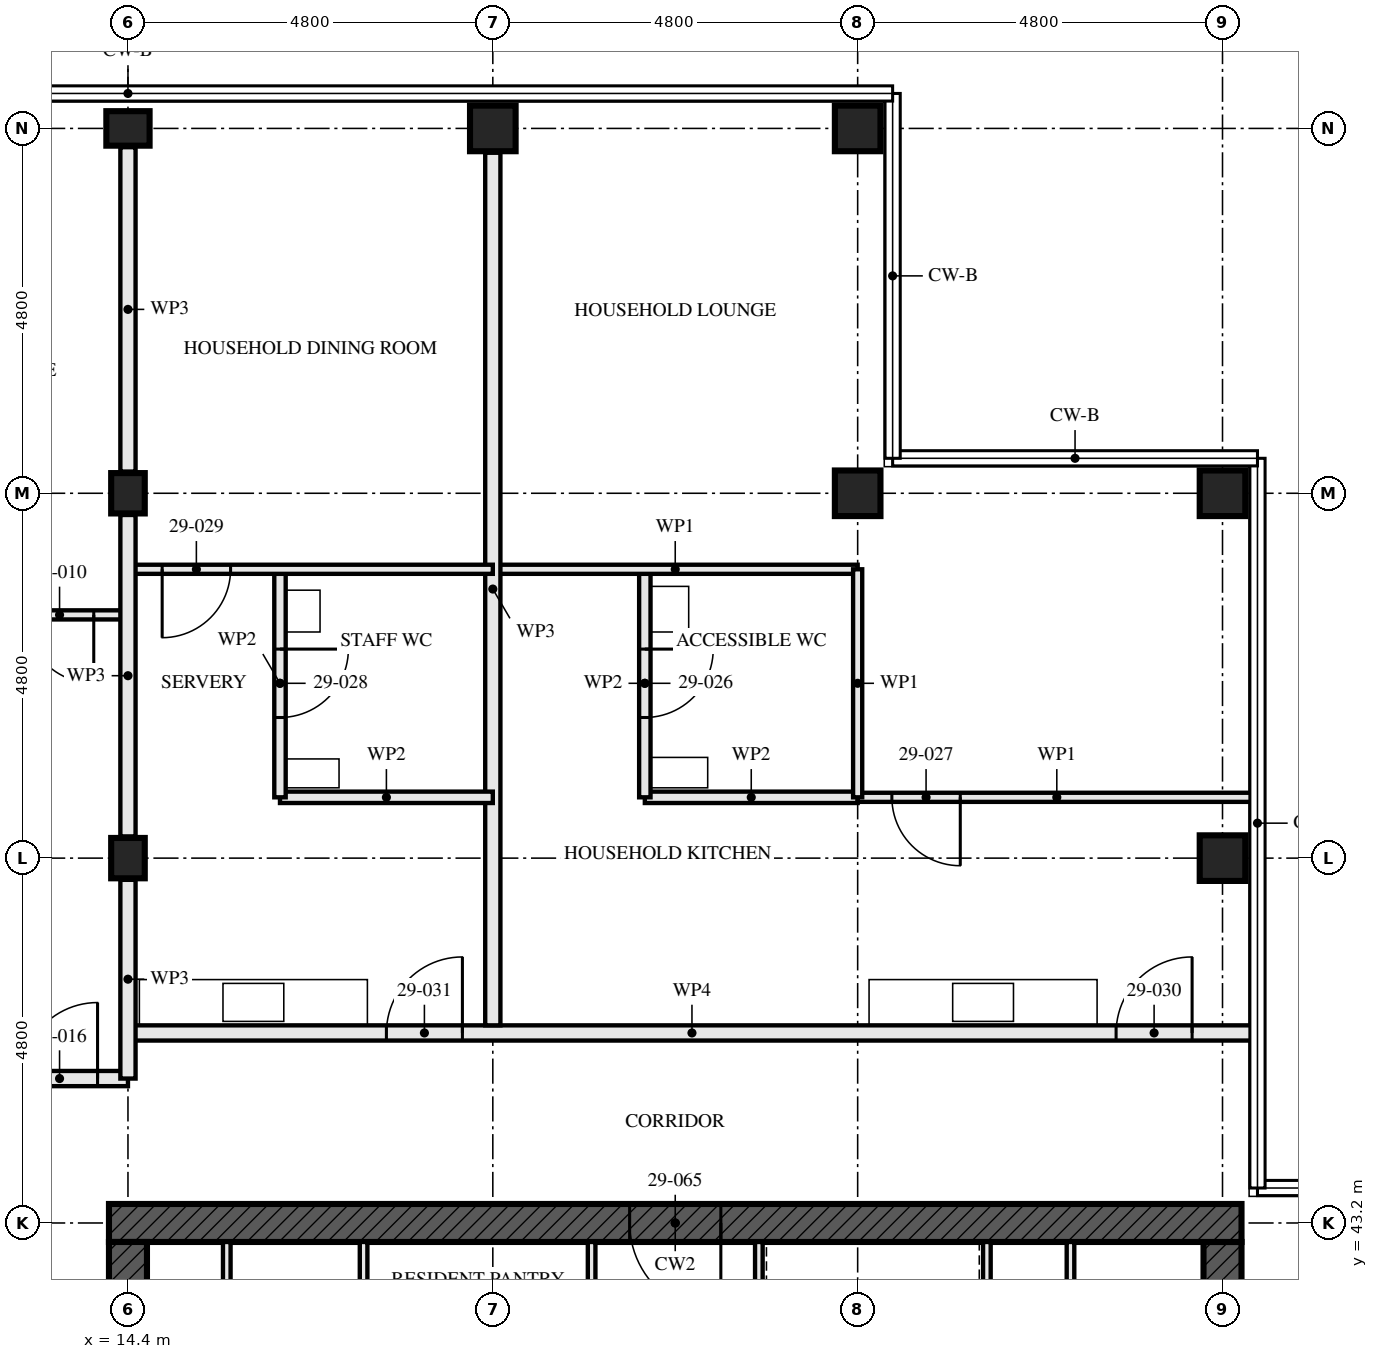
"""IFC4 building model, lengths in metres.
Left out: names, types, materials, properties, quantities, classifications, styles, units other than length and angle.
Written with IfcOpenShell. Run it as: python <this file> out.ifc"""

import sys

from ifc_helpers import new_model, si_unit, direction, frame, frame_2d, origin, origin_2d, place, context, subcontext, project, spatial, rectangle, hollow_rectangle, i_section, extrude, element, fill, save


model = new_model("IFC4")
c1 = context("Model", 3, precision=1e-05, world=origin(), true_north=direction((0.0, 1.0)))
c2 = subcontext(c1, "Body", "Model", "MODEL_VIEW")
j1 = project(units=[si_unit("LENGTHUNIT", "METRE"), si_unit("PLANEANGLEUNIT", "RADIAN")], contexts=[c1])
p1 = place(None, origin())
s1 = spatial("IfcSite", under=j1, at=p1, CompositionType="ELEMENT")
p2 = place(p1, origin())
s2 = spatial("IfcBuilding", under=s1, at=p2, CompositionType="ELEMENT")
p3 = place(p2, frame((0.0, 0.0, 108.5)))
s3 = spatial("IfcBuildingStorey", under=s2, at=p3, CompositionType="ELEMENT", Elevation=108.5)
for number, where, z_axis, x_axis in (
    (1, (14.4, 48.0, 0.0), (0.0, 0.0, 1.0), (1.0, 0.0, 0.0)),
    (2, (14.4, 52.8, 0.0), (0.0, 0.0, 1.0), (1.0, 0.0, 0.0)),
):
    element("IfcColumn", number, at=place(p3, frame(where, z_axis=z_axis, x_axis=x_axis)), inside=s3, PredefinedType="COLUMN", context=c2, shape_type="SweptSolid", body=[
        extrude(i_section(OverallWidth=0.442, OverallDepth=0.531, WebThickness=0.066, FlangeThickness=0.106, FilletRadius=0.015, at=origin_2d()), origin(), (0.0, 0.0, 1.0), 3.5),
    ])
p4 = place(p3, frame((14.4, 57.6, 0.0), z_axis=(0.0, 0.0, 1.0), x_axis=(0.0, 1.0, 0.0)))
e3 = element("IfcColumn", 3, at=p4, inside=s3, PredefinedType="COLUMN", context=c2, shape_type="SweptSolid", body=[
    extrude(i_section(OverallWidth=0.454, OverallDepth=0.569, WebThickness=0.078, FlangeThickness=0.125, FilletRadius=0.015, at=origin_2d()), origin(), (0.0, 0.0, 1.0), 3.5),
])
for number, where, z_axis, x_axis in (
    (4, (19.2, 57.6, 0.0), (0.0, 0.0, 1.0), (0.0, 1.0, 0.0)),
    (5, (24.0, 52.8, 0.0), (0.0, 0.0, 1.0), (0.0, 1.0, 0.0)),
    (6, (24.0, 57.6, 0.0), (0.0, 0.0, 1.0), (0.0, 1.0, 0.0)),
):
    element("IfcColumn", number, at=place(p3, frame(where, z_axis=z_axis, x_axis=x_axis)), inside=s3, PredefinedType="COLUMN", context=c2, shape_type="SweptSolid", body=[
        extrude(hollow_rectangle(XDim=0.6, YDim=0.6, WallThickness=0.06, at=origin_2d()), origin(), (0.0, 0.0, 1.0), 3.5),
    ])
p5 = place(p3, frame((28.8, 48.0, 0.0), z_axis=(0.0, 0.0, 1.0), x_axis=(1.0, 0.0, 0.0)))
e7 = element("IfcColumn", 7, at=p5, inside=s3, PredefinedType="COLUMN", context=c2, shape_type="SweptSolid", body=[
    extrude(hollow_rectangle(XDim=0.6, YDim=0.6, WallThickness=0.08, at=origin_2d()), origin(), (0.0, 0.0, 1.0), 3.5),
])
p6 = place(p3, frame((28.8, 52.8, 0.0), z_axis=(0.0, 0.0, 1.0), x_axis=(0.0, 1.0, 0.0)))
e8 = element("IfcColumn", 8, at=p6, inside=s3, PredefinedType="COLUMN", context=c2, shape_type="SweptSolid", body=[
    extrude(hollow_rectangle(XDim=0.6, YDim=0.6, WallThickness=0.06, at=origin_2d()), origin(), (0.0, 0.0, 1.0), 3.5),
])
p7 = place(p3, frame((29.05, 43.2, -0.17), z_axis=(0.0, 0.0, 1.0), x_axis=(-1.0, 0.0, 0.0)))
e9 = element("IfcWall", 9, at=p7, inside=s3, PredefinedType="SHEAR", context=c2, shape_type="SweptSolid", body=[
    extrude(rectangle(XDim=14.9, YDim=0.5, at=frame_2d((7.45, 0.0))), origin(), (0.0, 0.0, 1.0), 3.5),
])
p8 = place(p7, frame((6.85, 0.0, 0.17)))
e10 = element("IfcOpeningElement", 10, at=p8, cuts=e9, PredefinedType="OPENING", context=c2, shape_type="SweptSolid", body=[
    extrude(rectangle(XDim=1.2, YDim=2.1, at=frame_2d((0.6, 1.05))), frame((0.0, 0.26, 0.0), z_axis=(0.0, -1.0, 0.0), x_axis=(1.0, 0.0, 0.0)), (0.0, 0.0, 1.0), 0.521),
])
p9 = place(p3, frame((14.4, 42.95, -0.17), z_axis=(0.0, 0.0, 1.0), x_axis=(0.0, -1.0, 0.0)))
e11 = element("IfcWall", 11, at=p9, inside=s3, PredefinedType="SHEAR", context=c2, shape_type="SweptSolid", body=[
    extrude(rectangle(XDim=13.9, YDim=0.5, at=frame_2d((6.95, 0.0))), origin(), (0.0, 0.0, 1.0), 3.5),
])
p10 = place(p9, frame((6.35, 0.0, 0.17)))
e12 = element("IfcOpeningElement", 12, at=p10, cuts=e11, PredefinedType="OPENING", context=c2, shape_type="SweptSolid", body=[
    extrude(rectangle(XDim=1.2, YDim=2.1, at=frame_2d((0.6, 1.05))), frame((0.0, 0.26, 0.0), z_axis=(0.0, -1.0, 0.0), x_axis=(1.0, 0.0, 0.0)), (0.0, 0.0, 1.0), 0.521),
])
p11 = place(p3, frame((28.8, 29.05, -0.17), z_axis=(0.0, 0.0, 1.0), x_axis=(0.0, 1.0, 0.0)))
e13 = element("IfcWall", 13, at=p11, inside=s3, PredefinedType="SHEAR", context=c2, shape_type="SweptSolid", body=[
    extrude(rectangle(XDim=13.9, YDim=0.5, at=frame_2d((6.95, 0.0))), origin(), (0.0, 0.0, 1.0), 3.5),
])
p12 = place(p11, frame((6.35, 0.0, 0.17)))
e14 = element("IfcOpeningElement", 14, at=p12, cuts=e13, PredefinedType="OPENING", context=c2, shape_type="SweptSolid", body=[
    extrude(rectangle(XDim=1.2, YDim=2.1, at=frame_2d((0.6, 1.05))), frame((0.0, 0.26, 0.0), z_axis=(0.0, -1.0, 0.0), x_axis=(1.0, 0.0, 0.0)), (0.0, 0.0, 1.0), 0.521),
])
p13 = place(p3, frame((14.4, 51.2, 0.0), z_axis=(0.0, 0.0, 1.0), x_axis=(-1.0, 0.0, 0.0)))
e15 = element("IfcWall", 15, at=p13, inside=s3, PredefinedType="PARTITIONING", context=c2, shape_type="SweptSolid", body=[
    extrude(rectangle(XDim=4.8, YDim=0.12, at=frame_2d((2.4, 0.0))), origin(), (0.0, 0.0, 1.0), 3.33),
])
p14 = place(p13, frame((0.45, 0.0, 0.0)))
e16 = element("IfcOpeningElement", 16, at=p14, cuts=e15, PredefinedType="OPENING", context=c2, shape_type="SweptSolid", body=[
    extrude(rectangle(XDim=0.9, YDim=2.1, at=frame_2d((0.45, 1.05))), frame((0.0, 0.071, 0.0), z_axis=(0.0, -1.0, 0.0), x_axis=(1.0, 0.0, 0.0)), (0.0, 0.0, 1.0), 0.141),
])
p15 = place(p13, frame((2.925, 0.0, 0.0)))
e17 = element("IfcOpeningElement", 17, at=p15, cuts=e15, PredefinedType="OPENING", context=c2, shape_type="SweptSolid", body=[
    extrude(rectangle(XDim=0.95, YDim=2.1, at=frame_2d((0.475, 1.05))), frame((0.0, 0.071, 0.0), z_axis=(0.0, -1.0, 0.0), x_axis=(1.0, 0.0, 0.0)), (0.0, 0.0, 1.0), 0.141),
])
p16 = place(p3, frame((14.4, 45.1, 0.0), z_axis=(0.0, 0.0, 1.0), x_axis=(-1.0, 0.0, 0.0)))
e18 = element("IfcWall", 18, at=p16, inside=s3, PredefinedType="PARTITIONING", context=c2, shape_type="SweptSolid", body=[
    extrude(rectangle(XDim=9.6, YDim=0.2, at=frame_2d((4.8, 0.0))), origin(), (0.0, 0.0, 1.0), 3.33),
])
p17 = place(p16, frame((0.4, 0.0, 0.0)))
e19 = element("IfcOpeningElement", 19, at=p17, cuts=e18, PredefinedType="OPENING", context=c2, shape_type="SweptSolid", body=[
    extrude(rectangle(XDim=1.0, YDim=2.1, at=frame_2d((0.5, 1.05))), frame((0.0, 0.111, 0.0), z_axis=(0.0, -1.0, 0.0), x_axis=(1.0, 0.0, 0.0)), (0.0, 0.0, 1.0), 0.221),
])
p18 = place(p16, frame((5.2, 0.0, 0.0)))
e20 = element("IfcOpeningElement", 20, at=p18, cuts=e18, PredefinedType="OPENING", context=c2, shape_type="SweptSolid", body=[
    extrude(rectangle(XDim=1.0, YDim=2.1, at=frame_2d((0.5, 1.05))), frame((0.0, 0.111, 0.0), z_axis=(0.0, -1.0, 0.0), x_axis=(1.0, 0.0, 0.0)), (0.0, 0.0, 1.0), 0.221),
])
p19 = place(p3, frame((21.2, 51.8, 0.0), z_axis=(0.0, 0.0, 1.0), x_axis=(0.0, -1.0, 0.0)))
e21 = element("IfcWall", 21, at=p19, inside=s3, PredefinedType="PARTITIONING", context=c2, shape_type="SweptSolid", body=[
    extrude(rectangle(XDim=3.0, YDim=0.15, at=frame_2d((1.5, 0.0))), origin(), (0.0, 0.0, 1.0), 3.33),
])
p20 = place(p19, frame((1.05, 0.0, 0.0)))
e22 = element("IfcOpeningElement", 22, at=p20, cuts=e21, PredefinedType="OPENING", context=c2, shape_type="SweptSolid", body=[
    extrude(rectangle(XDim=0.9, YDim=2.1, at=frame_2d((0.45, 1.05))), frame((0.0, 0.085, 0.0), z_axis=(0.0, -1.0, 0.0), x_axis=(1.0, 0.0, 0.0)), (0.0, 0.0, 1.0), 0.171),
])
p21 = place(p3, frame((24.0, 48.8, 0.0), z_axis=(0.0, 0.0, 1.0), x_axis=(-1.0, 0.0, 0.0)))
e23 = element("IfcWall", 23, at=p21, inside=s3, PredefinedType="PARTITIONING", context=c2, shape_type="SweptSolid", body=[
    extrude(rectangle(XDim=2.8, YDim=0.15, at=frame_2d((1.4, 0.0))), origin(), (0.0, 0.0, 1.0), 3.33),
])
p22 = place(p3, frame((29.24, 48.8, 0.0), z_axis=(0.0, 0.0, 1.0), x_axis=(-1.0, 0.0, 0.0)))
e24 = element("IfcWall", 24, at=p22, inside=s3, PredefinedType="PARTITIONING", context=c2, shape_type="SweptSolid", body=[
    extrude(rectangle(XDim=5.24, YDim=0.12, at=frame_2d((2.62, 0.0))), origin(), (0.0, 0.0, 1.0), 2.32),
])
p23 = place(p22, frame((3.89, 0.0, 0.0)))
e25 = element("IfcOpeningElement", 25, at=p23, cuts=e24, PredefinedType="OPENING", context=c2, shape_type="SweptSolid", body=[
    extrude(rectangle(XDim=0.9, YDim=2.1, at=frame_2d((0.45, 1.05))), frame((0.0, 0.071, 0.0), z_axis=(0.0, -1.0, 0.0), x_axis=(1.0, 0.0, 0.0)), (0.0, 0.0, 1.0), 0.141),
])
p24 = place(p3, frame((24.0, 51.8, 0.0), z_axis=(0.0, 0.0, 1.0), x_axis=(-1.0, 0.0, 0.0)))
e26 = element("IfcWall", 26, at=p24, inside=s3, PredefinedType="PARTITIONING", context=c2, shape_type="SweptSolid", body=[
    extrude(rectangle(XDim=4.8, YDim=0.12, at=frame_2d((2.4, 0.0))), origin(), (0.0, 0.0, 1.0), 3.33),
])
p25 = place(p3, frame((24.0, 51.8, 0.0), z_axis=(0.0, 0.0, 1.0), x_axis=(0.0, -1.0, 0.0)))
e27 = element("IfcWall", 27, at=p25, inside=s3, PredefinedType="PARTITIONING", context=c2, shape_type="SweptSolid", body=[
    extrude(rectangle(XDim=3.0, YDim=0.12, at=frame_2d((1.5, 0.0))), origin(), (0.0, 0.0, 1.0), 3.33),
])
p26 = place(p3, frame((19.2, 57.28, 0.0), z_axis=(0.0, 0.0, 1.0), x_axis=(0.0, -1.0, 0.0)))
e28 = element("IfcWall", 28, at=p26, inside=s3, PredefinedType="PARTITIONING", context=c2, shape_type="SweptSolid", body=[
    extrude(rectangle(XDim=11.48, YDim=0.2, at=frame_2d((5.74, 0.0))), origin(), (0.0, 0.0, 1.0), 2.55),
])
p27 = place(p3, frame((16.4, 51.8, 0.0), z_axis=(0.0, 0.0, 1.0), x_axis=(0.0, -1.0, 0.0)))
e29 = element("IfcWall", 29, at=p27, inside=s3, PredefinedType="PARTITIONING", context=c2, shape_type="SweptSolid", body=[
    extrude(rectangle(XDim=3.0, YDim=0.15, at=frame_2d((1.5, 0.0))), origin(), (0.0, 0.0, 1.0), 3.33),
])
p28 = place(p27, frame((1.05, 0.0, 0.0)))
e30 = element("IfcOpeningElement", 30, at=p28, cuts=e29, PredefinedType="OPENING", context=c2, shape_type="SweptSolid", body=[
    extrude(rectangle(XDim=0.9, YDim=2.1, at=frame_2d((0.45, 1.05))), frame((0.0, 0.085, 0.0), z_axis=(0.0, -1.0, 0.0), x_axis=(1.0, 0.0, 0.0)), (0.0, 0.0, 1.0), 0.171),
])
p29 = place(p3, frame((19.2, 48.8, 0.0), z_axis=(0.0, 0.0, 1.0), x_axis=(-1.0, 0.0, 0.0)))
e31 = element("IfcWall", 31, at=p29, inside=s3, PredefinedType="PARTITIONING", context=c2, shape_type="SweptSolid", body=[
    extrude(rectangle(XDim=2.8, YDim=0.15, at=frame_2d((1.4, 0.0))), origin(), (0.0, 0.0, 1.0), 3.33),
])
p30 = place(p3, frame((19.2, 51.8, 0.0), z_axis=(0.0, 0.0, 1.0), x_axis=(-1.0, 0.0, 0.0)))
e32 = element("IfcWall", 32, at=p30, inside=s3, PredefinedType="PARTITIONING", context=c2, shape_type="SweptSolid", body=[
    extrude(rectangle(XDim=4.8, YDim=0.12, at=frame_2d((2.4, 0.0))), origin(), (0.0, 0.0, 1.0), 3.33),
])
p31 = place(p30, frame((3.45, 0.0, 0.0)))
e33 = element("IfcOpeningElement", 33, at=p31, cuts=e32, PredefinedType="OPENING", context=c2, shape_type="SweptSolid", body=[
    extrude(rectangle(XDim=0.9, YDim=2.1, at=frame_2d((0.45, 1.05))), frame((0.0, 0.071, 0.0), z_axis=(0.0, -1.0, 0.0), x_axis=(1.0, 0.0, 0.0)), (0.0, 0.0, 1.0), 0.141),
])
p32 = place(p3, frame((29.24, 45.7, 0.0), z_axis=(0.0, 0.0, 1.0), x_axis=(-1.0, 0.0, 0.0)))
e34 = element("IfcWall", 34, at=p32, inside=s3, PredefinedType="PARTITIONING", context=c2, shape_type="SweptSolid", body=[
    extrude(rectangle(XDim=14.84, YDim=0.2, at=frame_2d((7.42, 0.0))), origin(), (0.0, 0.0, 1.0), 2.32),
])
p33 = place(p32, frame((0.84, 0.0, 0.0)))
e35 = element("IfcOpeningElement", 35, at=p33, cuts=e34, PredefinedType="OPENING", context=c2, shape_type="SweptSolid", body=[
    extrude(rectangle(XDim=1.0, YDim=2.1, at=frame_2d((0.5, 1.05))), frame((0.0, 0.111, 0.0), z_axis=(0.0, -1.0, 0.0), x_axis=(1.0, 0.0, 0.0)), (0.0, 0.0, 1.0), 0.221),
])
p34 = place(p32, frame((10.44, 0.0, 0.0)))
e36 = element("IfcOpeningElement", 36, at=p34, cuts=e34, PredefinedType="OPENING", context=c2, shape_type="SweptSolid", body=[
    extrude(rectangle(XDim=1.0, YDim=2.1, at=frame_2d((0.5, 1.05))), frame((0.0, 0.111, 0.0), z_axis=(0.0, -1.0, 0.0), x_axis=(1.0, 0.0, 0.0)), (0.0, 0.0, 1.0), 0.221),
])
for number, where, z_axis, x_axis in (
    (37, (15.7, 37.15, 0.0), (0.0, 0.0, 1.0), (0.0, 1.0, 0.0)),
    (38, (26.8, 37.15, 0.0), (0.0, 0.0, 1.0), (0.0, 1.0, 0.0)),
):
    element("IfcWall", number, at=place(p3, frame(where, z_axis=z_axis, x_axis=x_axis)), inside=s3, PredefinedType="SOLIDWALL", context=c2, shape_type="SweptSolid", body=[
        extrude(rectangle(XDim=5.8, YDim=0.1, at=frame_2d((2.9, 0.0))), origin(), (0.0, 0.0, 1.0), 3.33),
    ])
p35 = place(p3, frame((20.5, 37.15, 0.0), z_axis=(0.0, 0.0, 1.0), x_axis=(0.0, 1.0, 0.0)))
e39 = element("IfcWall", 39, at=p35, inside=s3, PredefinedType="SOLIDWALL", context=c2, shape_type="SweptSolid", body=[
    extrude(rectangle(XDim=5.8, YDim=0.1, at=frame_2d((2.9, 0.0))), origin(), (0.0, 0.0, 1.0), 3.33),
])
p36 = place(p35, frame((0.975, 0.0, 0.0)))
e40 = element("IfcOpeningElement", 40, at=p36, cuts=e39, PredefinedType="OPENING", context=c2, shape_type="SweptSolid", body=[
    extrude(rectangle(XDim=0.9, YDim=2.1, at=frame_2d((0.45, 1.05))), frame((0.0, 0.061, 0.0), z_axis=(0.0, -1.0, 0.0), x_axis=(1.0, 0.0, 0.0)), (0.0, 0.0, 1.0), 0.121),
])
p37 = place(p3, frame((22.7, 37.15, 0.0), z_axis=(0.0, 0.0, 1.0), x_axis=(0.0, 1.0, 0.0)))
e41 = element("IfcWall", 41, at=p37, inside=s3, PredefinedType="SOLIDWALL", context=c2, shape_type="SweptSolid", body=[
    extrude(rectangle(XDim=5.8, YDim=0.1, at=frame_2d((2.9, 0.0))), origin(), (0.0, 0.0, 1.0), 3.33),
])
p38 = place(p37, frame((0.925, 0.0, 0.0)))
e42 = element("IfcOpeningElement", 42, at=p38, cuts=e41, PredefinedType="OPENING", context=c2, shape_type="SweptSolid", body=[
    extrude(rectangle(XDim=1.0, YDim=2.1, at=frame_2d((0.5, 1.05))), frame((0.0, 0.061, 0.0), z_axis=(0.0, -1.0, 0.0), x_axis=(1.0, 0.0, 0.0)), (0.0, 0.0, 1.0), 0.121),
])
p39 = place(p37, frame((3.9, 0.0, 0.0)))
e43 = element("IfcOpeningElement", 43, at=p39, cuts=e41, PredefinedType="OPENING", context=c2, shape_type="SweptSolid", body=[
    extrude(rectangle(XDim=1.0, YDim=2.1, at=frame_2d((0.5, 1.05))), frame((0.0, 0.061, 0.0), z_axis=(0.0, -1.0, 0.0), x_axis=(1.0, 0.0, 0.0)), (0.0, 0.0, 1.0), 0.121),
])
for number, where, z_axis, x_axis in (
    (44, (17.5, 37.15, 0.0), (0.0, 0.0, 1.0), (0.0, 1.0, 0.0)),
    (45, (25.7, 37.15, 0.0), (0.0, 0.0, 1.0), (0.0, 1.0, 0.0)),
):
    element("IfcWall", number, at=place(p3, frame(where, z_axis=z_axis, x_axis=x_axis)), inside=s3, PredefinedType="SOLIDWALL", context=c2, shape_type="SweptSolid", body=[
        extrude(rectangle(XDim=5.8, YDim=0.1, at=frame_2d((2.9, 0.0))), origin(), (0.0, 0.0, 1.0), 3.33),
    ])
p40 = place(p3, frame((14.4, 45.1, 0.0), z_axis=(0.0, 0.0, 1.0), x_axis=(0.0, 1.0, 0.0)))
e46 = element("IfcWall", 46, at=p40, inside=s3, PredefinedType="PARTITIONING", context=c2, shape_type="SweptSolid", body=[
    extrude(rectangle(XDim=2.615, YDim=0.2, at=frame_2d((1.307, 0.0))), origin(), (0.0, 0.0, 1.0), 2.32),
])
p41 = place(p3, frame((14.4, 48.285, 0.0), z_axis=(0.0, 0.0, 1.0), x_axis=(0.0, 1.0, 0.0)))
e47 = element("IfcWall", 47, at=p41, inside=s3, PredefinedType="PARTITIONING", context=c2, shape_type="SweptSolid", body=[
    extrude(rectangle(XDim=4.229, YDim=0.2, at=frame_2d((2.115, 0.0))), origin(), (0.0, 0.0, 1.0), 2.32),
])
p42 = place(p3, frame((14.4, 53.085, 0.0), z_axis=(0.0, 0.0, 1.0), x_axis=(0.0, 1.0, 0.0)))
e48 = element("IfcWall", 48, at=p42, inside=s3, PredefinedType="PARTITIONING", context=c2, shape_type="SweptSolid", body=[
    extrude(rectangle(XDim=4.268, YDim=0.2, at=frame_2d((2.134, 0.0))), origin(), (0.0, 0.0, 1.0), 2.32),
])
p43 = place(p14, origin())
e49 = element("IfcDoor", 49, at=p43, inside=s3, OperationType="SINGLE_SWING_RIGHT", PredefinedType="DOOR", context=c2, shape_type="SweptSolid", body=[
    extrude(rectangle(XDim=0.9, YDim=2.1, at=frame_2d((0.45, 1.05))), frame((0.0, 0.022, 0.0), z_axis=(0.0, -1.0, 0.0), x_axis=(1.0, 0.0, 0.0)), (0.0, 0.0, 1.0), 0.044),
])
fill(e16, e49)
p44 = place(p17, frame((1.0, 0.0, 0.0), z_axis=(0.0, 0.0, 1.0), x_axis=(-1.0, 0.0, 0.0)))
e50 = element("IfcDoor", 50, at=p44, inside=s3, OperationType="SINGLE_SWING_LEFT", PredefinedType="DOOR", context=c2, shape_type="SweptSolid", body=[
    extrude(rectangle(XDim=1.0, YDim=2.1, at=frame_2d((0.5, 1.05))), frame((0.0, 0.027, 0.0), z_axis=(0.0, -1.0, 0.0), x_axis=(1.0, 0.0, 0.0)), (0.0, 0.0, 1.0), 0.054),
])
fill(e19, e50)
p45 = place(p20, origin())
e51 = element("IfcDoor", 51, at=p45, inside=s3, OperationType="SINGLE_SWING_RIGHT", PredefinedType="DOOR", context=c2, shape_type="SweptSolid", body=[
    extrude(rectangle(XDim=0.9, YDim=2.1, at=frame_2d((0.45, 1.05))), frame((0.0, 0.022, 0.0), z_axis=(0.0, -1.0, 0.0), x_axis=(1.0, 0.0, 0.0)), (0.0, 0.0, 1.0), 0.044),
])
fill(e22, e51)
p46 = place(p23, origin())
e52 = element("IfcDoor", 52, at=p46, inside=s3, OperationType="SINGLE_SWING_RIGHT", PredefinedType="DOOR", context=c2, shape_type="SweptSolid", body=[
    extrude(rectangle(XDim=0.9, YDim=2.1, at=frame_2d((0.45, 1.05))), frame((0.0, 0.022, 0.0), z_axis=(0.0, -1.0, 0.0), x_axis=(1.0, 0.0, 0.0)), (0.0, 0.0, 1.0), 0.044),
])
fill(e25, e52)
p47 = place(p28, origin())
e53 = element("IfcDoor", 53, at=p47, inside=s3, OperationType="SINGLE_SWING_RIGHT", PredefinedType="DOOR", context=c2, shape_type="SweptSolid", body=[
    extrude(rectangle(XDim=0.9, YDim=2.1, at=frame_2d((0.45, 1.05))), frame((0.0, 0.022, 0.0), z_axis=(0.0, -1.0, 0.0), x_axis=(1.0, 0.0, 0.0)), (0.0, 0.0, 1.0), 0.044),
])
fill(e30, e53)
p48 = place(p31, origin())
e54 = element("IfcDoor", 54, at=p48, inside=s3, OperationType="SINGLE_SWING_LEFT", PredefinedType="DOOR", context=c2, shape_type="SweptSolid", body=[
    extrude(rectangle(XDim=0.9, YDim=2.1, at=frame_2d((0.45, 1.05))), frame((0.0, 0.022, 0.0), z_axis=(0.0, -1.0, 0.0), x_axis=(1.0, 0.0, 0.0)), (0.0, 0.0, 1.0), 0.044),
])
fill(e33, e54)
p49 = place(p33, frame((1.0, 0.0, 0.0), z_axis=(0.0, 0.0, 1.0), x_axis=(-1.0, 0.0, 0.0)))
e55 = element("IfcDoor", 55, at=p49, inside=s3, OperationType="SINGLE_SWING_LEFT", PredefinedType="DOOR", context=c2, shape_type="SweptSolid", body=[
    extrude(rectangle(XDim=1.0, YDim=2.1, at=frame_2d((0.5, 1.05))), frame((0.0, 0.027, 0.0), z_axis=(0.0, -1.0, 0.0), x_axis=(1.0, 0.0, 0.0)), (0.0, 0.0, 1.0), 0.054),
])
fill(e35, e55)
p50 = place(p34, frame((1.0, 0.0, 0.0), z_axis=(0.0, 0.0, 1.0), x_axis=(-1.0, 0.0, 0.0)))
e56 = element("IfcDoor", 56, at=p50, inside=s3, OperationType="SINGLE_SWING_LEFT", PredefinedType="DOOR", context=c2, shape_type="SweptSolid", body=[
    extrude(rectangle(XDim=1.0, YDim=2.1, at=frame_2d((0.5, 1.05))), frame((0.0, 0.027, 0.0), z_axis=(0.0, -1.0, 0.0), x_axis=(1.0, 0.0, 0.0)), (0.0, 0.0, 1.0), 0.054),
])
fill(e36, e56)
p51 = place(p8, origin())
e57 = element("IfcDoor", 57, at=p51, inside=s3, OperationType="SINGLE_SWING_LEFT", PredefinedType="DOOR", context=c2, shape_type="SweptSolid", body=[
    extrude(rectangle(XDim=1.2, YDim=2.1, at=frame_2d((0.6, 1.05))), frame((0.0, 0.027, 0.0), z_axis=(0.0, -1.0, 0.0), x_axis=(1.0, 0.0, 0.0)), (0.0, 0.0, 1.0), 0.054),
])
fill(e10, e57)
save(model, sys.argv[1])
